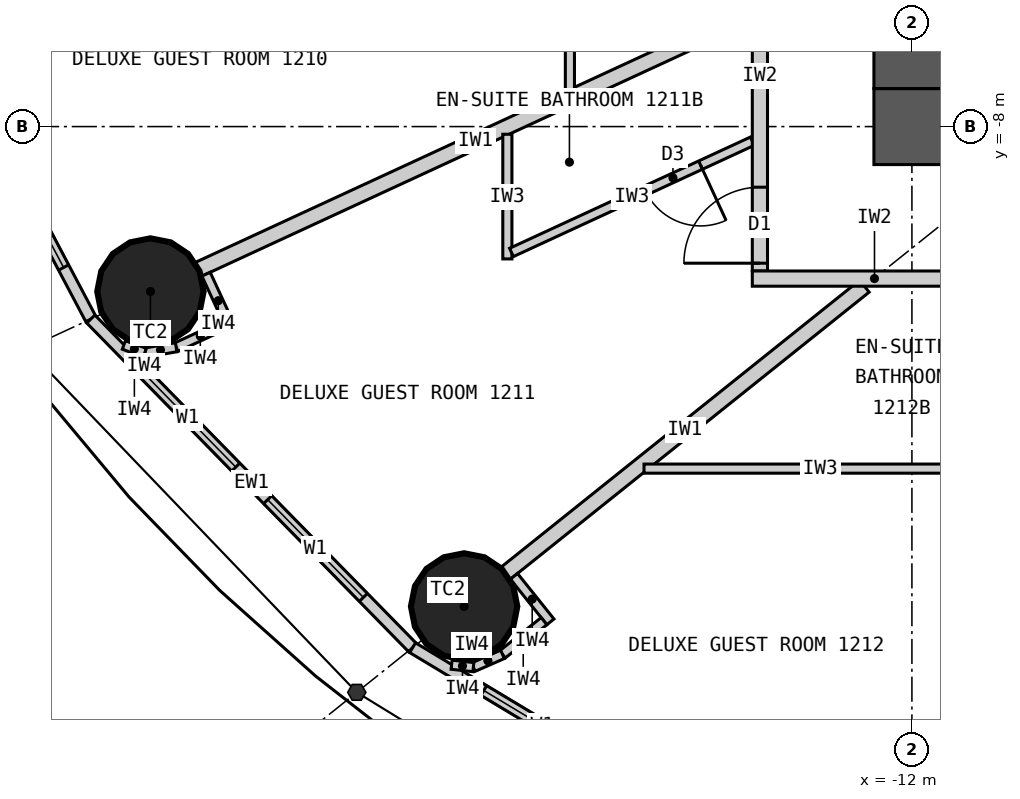
"""IFC4 building model, lengths in metres.
Left out: names, types, materials, properties, quantities, classifications, styles, units other than length and angle.
Written with IfcOpenShell. Run it as: python <this file> out.ifc"""

import sys

from ifc_helpers import new_model, si_unit, direction, frame, frame_2d, origin, origin_2d, place, context, subcontext, project, spatial, rectangle, circle, extrude, element, fill, save


model = new_model("IFC4")
c1 = context("Model", 3, precision=1e-05, world=origin(), true_north=direction((0.0, 1.0)))
c2 = subcontext(c1, "Body", "Model", "MODEL_VIEW")
j1 = project(units=[si_unit("LENGTHUNIT", "METRE"), si_unit("PLANEANGLEUNIT", "RADIAN")], contexts=[c1])
p1 = place(None, origin())
s1 = spatial("IfcSite", under=j1, at=p1, CompositionType="ELEMENT")
p2 = place(p1, origin())
s2 = spatial("IfcBuilding", under=s1, at=p2, CompositionType="ELEMENT")
p3 = place(p2, frame((0.0, 0.0, 54.0)))
s3 = spatial("IfcBuildingStorey", under=s2, at=p3, CompositionType="ELEMENT", Elevation=54.0)
for number, where, z_axis, x_axis in (
    (1, (-22.019, -10.17, 0.0), (0.0, 0.0, 1.0), (1.0, 0.0, 0.0)),
    (2, (-17.892, -14.313, 0.0), (0.0, 0.0, 1.0), (1.0, 0.0, 0.0)),
):
    element("IfcColumn", number, at=place(p3, frame(where, z_axis=z_axis, x_axis=x_axis)), inside=s3, PredefinedType="COLUMN", context=c2, shape_type="SweptSolid", body=[
        extrude(circle(Radius=0.7, at=origin_2d()), origin(), (0.0, 0.0, 1.0), 3.3),
    ])
p4 = place(p3, frame((12.5, -8.0, 0.0), z_axis=(0.0, 0.0, 1.0), x_axis=(-1.0, 0.0, 0.0)))
e3 = element("IfcWall", 3, at=p4, inside=s3, PredefinedType="SHEAR", context=c2, shape_type="SweptSolid", body=[
    extrude(rectangle(XDim=25.0, YDim=1.0, at=frame_2d((12.5, 0.0))), origin(), (0.0, 0.0, 1.0), 3.3),
])
p5 = place(p4, frame((11.2, 0.0, 0.0)))
e4 = element("IfcOpeningElement", 4, at=p5, cuts=e3, PredefinedType="OPENING", context=c2, shape_type="SweptSolid", body=[
    extrude(rectangle(XDim=1.2, YDim=2.2, at=frame_2d((0.6, 1.1))), frame((0.0, 0.51, 0.0), z_axis=(0.0, -1.0, 0.0), x_axis=(1.0, 0.0, 0.0)), (0.0, 0.0, 1.0), 1.02),
])
p6 = place(p4, frame((18.8, 0.0, 0.0)))
e5 = element("IfcOpeningElement", 5, at=p6, cuts=e3, PredefinedType="OPENING", context=c2, shape_type="SweptSolid", body=[
    extrude(rectangle(XDim=0.9, YDim=2.2, at=frame_2d((0.45, 1.1))), frame((0.0, 0.51, 0.0), z_axis=(0.0, -1.0, 0.0), x_axis=(1.0, 0.0, 0.0)), (0.0, 0.0, 1.0), 1.02),
])
p7 = place(p3, frame((-12.0, 7.5, 0.0), z_axis=(0.0, 0.0, 1.0), x_axis=(0.0, -1.0, 0.0)))
e6 = element("IfcWall", 6, at=p7, inside=s3, PredefinedType="SHEAR", context=c2, shape_type="SweptSolid", body=[
    extrude(rectangle(XDim=15.0, YDim=1.0, at=frame_2d((7.5, 0.0))), origin(), (0.0, 0.0, 1.0), 3.3),
])
p8 = place(p7, frame((6.6, 0.0, 0.0)))
e7 = element("IfcOpeningElement", 7, at=p8, cuts=e6, PredefinedType="OPENING", context=c2, shape_type="SweptSolid", body=[
    extrude(rectangle(XDim=1.8, YDim=2.2, at=frame_2d((0.9, 1.1))), frame((0.0, 0.51, 0.0), z_axis=(0.0, -1.0, 0.0), x_axis=(1.0, 0.0, 0.0)), (0.0, 0.0, 1.0), 1.02),
])
p9 = place(p3, frame((-25.482, -5.462, 0.0), z_axis=(0.0, 0.0, 1.0), x_axis=(0.467296867008, -0.884100468321, 0.0)))
e8 = element("IfcWall", 8, at=p9, inside=s3, PredefinedType="ELEMENTEDWALL", context=c2, shape_type="SweptSolid", body=[
    extrude(rectangle(XDim=5.734, YDim=0.15, at=frame_2d((2.867, 0.0))), origin(), (0.0, 0.0, 1.0), 3.12),
])
p10 = place(p9, frame((0.767, 0.0, 0.9)))
e9 = element("IfcOpeningElement", 9, at=p10, cuts=e8, PredefinedType="OPENING", context=c2, shape_type="SweptSolid", body=[
    extrude(rectangle(XDim=1.8, YDim=1.9, at=frame_2d((0.9, 0.95))), frame((0.0, 0.085, 0.0), z_axis=(0.0, -1.0, 0.0), x_axis=(1.0, 0.0, 0.0)), (0.0, 0.0, 1.0), 0.17),
])
p11 = place(p9, frame((3.167, 0.0, 0.9)))
e10 = element("IfcOpeningElement", 10, at=p11, cuts=e8, PredefinedType="OPENING", context=c2, shape_type="SweptSolid", body=[
    extrude(rectangle(XDim=1.8, YDim=1.9, at=frame_2d((0.9, 0.95))), frame((0.0, 0.085, 0.0), z_axis=(0.0, -1.0, 0.0), x_axis=(1.0, 0.0, 0.0)), (0.0, 0.0, 1.0), 0.17),
])
p12 = place(p3, frame((-22.803, -10.532, 0.0), z_axis=(0.0, 0.0, 1.0), x_axis=(0.699602905915, -0.714531856557, 0.0)))
e11 = element("IfcWall", 11, at=p12, inside=s3, PredefinedType="ELEMENTEDWALL", context=c2, shape_type="SweptSolid", body=[
    extrude(rectangle(XDim=6.051, YDim=0.15, at=frame_2d((3.025, 0.0))), origin(), (0.0, 0.0, 1.0), 3.12),
])
p13 = place(p12, frame((0.926, 0.0, 0.9)))
e12 = element("IfcOpeningElement", 12, at=p13, cuts=e11, PredefinedType="OPENING", context=c2, shape_type="SweptSolid", body=[
    extrude(rectangle(XDim=1.8, YDim=1.9, at=frame_2d((0.9, 0.95))), frame((0.0, 0.085, 0.0), z_axis=(0.0, -1.0, 0.0), x_axis=(1.0, 0.0, 0.0)), (0.0, 0.0, 1.0), 0.17),
])
p14 = place(p12, frame((3.325, 0.0, 0.9)))
e13 = element("IfcOpeningElement", 13, at=p14, cuts=e11, PredefinedType="OPENING", context=c2, shape_type="SweptSolid", body=[
    extrude(rectangle(XDim=1.8, YDim=1.9, at=frame_2d((0.9, 0.95))), frame((0.0, 0.085, 0.0), z_axis=(0.0, -1.0, 0.0), x_axis=(1.0, 0.0, 0.0)), (0.0, 0.0, 1.0), 0.17),
])
p15 = place(p3, frame((-18.57, -14.856, 0.0), z_axis=(0.0, 0.0, 1.0), x_axis=(0.856983180864, -0.515344377787, 0.0)))
e14 = element("IfcWall", 14, at=p15, inside=s3, PredefinedType="ELEMENTEDWALL", context=c2, shape_type="SweptSolid", body=[
    extrude(rectangle(XDim=6.386, YDim=0.15, at=frame_2d((3.193, 0.0))), origin(), (0.0, 0.0, 1.0), 3.12),
])
p16 = place(p15, frame((1.093, 0.0, 0.9)))
e15 = element("IfcOpeningElement", 15, at=p16, cuts=e14, PredefinedType="OPENING", context=c2, shape_type="SweptSolid", body=[
    extrude(rectangle(XDim=1.8, YDim=1.9, at=frame_2d((0.9, 0.95))), frame((0.0, 0.085, 0.0), z_axis=(0.0, -1.0, 0.0), x_axis=(1.0, 0.0, 0.0)), (0.0, 0.0, 1.0), 0.17),
])
p17 = place(p15, frame((3.493, 0.0, 0.9)))
e16 = element("IfcOpeningElement", 16, at=p17, cuts=e14, PredefinedType="OPENING", context=c2, shape_type="SweptSolid", body=[
    extrude(rectangle(XDim=1.8, YDim=1.9, at=frame_2d((0.9, 0.95))), frame((0.0, 0.085, 0.0), z_axis=(0.0, -1.0, 0.0), x_axis=(1.0, 0.0, 0.0)), (0.0, 0.0, 1.0), 0.17),
])
p18 = place(p3, frame((-14.1, -6.512, 0.0), z_axis=(0.0, 0.0, 1.0), x_axis=(-0.907832871056, -0.419332181247, 0.0)))
e17 = element("IfcWall", 17, at=p18, inside=s3, PredefinedType="PARTITIONING", context=c2, shape_type="SweptSolid", body=[
    extrude(rectangle(XDim=8.023, YDim=0.2, at=frame_2d((4.011, 0.0))), origin(), (0.0, 0.0, 1.0), 2.32),
])
p19 = place(p3, frame((-12.625, -10.1, 0.0), z_axis=(0.0, 0.0, 1.0), x_axis=(-0.780892451574, -0.624665493744, 0.0)))
e18 = element("IfcWall", 18, at=p19, inside=s3, PredefinedType="PARTITIONING", context=c2, shape_type="SweptSolid", body=[
    extrude(rectangle(XDim=6.045, YDim=0.2, at=frame_2d((3.022, 0.0))), origin(), (0.0, 0.0, 1.0), 2.32),
])
p20 = place(p3, frame((-7.289, -10.1, 0.0), z_axis=(0.0, 0.0, 1.0), x_axis=(-0.585198353053, -0.810890182197, 0.0)))
e19 = element("IfcWall", 19, at=p20, inside=s3, PredefinedType="PARTITIONING", context=c2, shape_type="SweptSolid", body=[
    extrude(rectangle(XDim=8.36, YDim=0.2, at=frame_2d((4.18, 0.0))), origin(), (0.0, 0.0, 1.0), 2.32),
])
p21 = place(p3, frame((-16.5, -7.521, 0.0), z_axis=(0.0, 0.0, 1.0), x_axis=(0.0, 1.0, 0.0)))
e20 = element("IfcWall", 20, at=p21, inside=s3, PredefinedType="PARTITIONING", context=c2, shape_type="SweptSolid", body=[
    extrude(rectangle(XDim=2.749, YDim=0.12, at=frame_2d((1.374, 0.0))), origin(), (0.0, 0.0, 1.0), 3.12),
])
p22 = place(p3, frame((-17.323, -8.101, 0.0), z_axis=(0.0, 0.0, 1.0), x_axis=(0.0, -1.0, 0.0)))
e21 = element("IfcWall", 21, at=p22, inside=s3, PredefinedType="PARTITIONING", context=c2, shape_type="SweptSolid", body=[
    extrude(rectangle(XDim=1.64, YDim=0.12, at=frame_2d((0.82, 0.0))), origin(), (0.0, 0.0, 1.0), 3.12),
])
p23 = place(p3, frame((-14.1, -8.193, 0.0), z_axis=(0.0, 0.0, 1.0), x_axis=(-0.907836493557, -0.419324338628, 0.0)))
e22 = element("IfcWall", 22, at=p23, inside=s3, PredefinedType="PARTITIONING", context=c2, shape_type="SweptSolid", body=[
    extrude(rectangle(XDim=3.49, YDim=0.12, at=frame_2d((1.745, 0.0))), origin(), (0.0, 0.0, 1.0), 3.12),
])
p24 = place(p23, frame((0.75, 0.0, 0.0)))
e23 = element("IfcOpeningElement", 23, at=p24, cuts=e22, PredefinedType="OPENING", context=c2, shape_type="SweptSolid", body=[
    extrude(rectangle(XDim=0.8, YDim=2.1, at=frame_2d((0.4, 1.05))), frame((0.0, 0.07, 0.0), z_axis=(0.0, -1.0, 0.0), x_axis=(1.0, 0.0, 0.0)), (0.0, 0.0, 1.0), 0.14),
])
p25 = place(p3, frame((-15.525, -12.5, 0.0), z_axis=(0.0, 0.0, 1.0), x_axis=(1.0, 0.0, 0.0)))
e24 = element("IfcWall", 24, at=p25, inside=s3, PredefinedType="PARTITIONING", context=c2, shape_type="SweptSolid", body=[
    extrude(rectangle(XDim=4.64, YDim=0.12, at=frame_2d((2.32, 0.0))), origin(), (0.0, 0.0, 1.0), 3.12),
])
p26 = place(p3, frame((-14.0, -4.772, 0.0), z_axis=(0.0, 0.0, 1.0), x_axis=(0.0, -1.0, 0.0)))
e25 = element("IfcWall", 25, at=p26, inside=s3, PredefinedType="PARTITIONING", context=c2, shape_type="SweptSolid", body=[
    extrude(rectangle(XDim=5.127, YDim=0.2, at=frame_2d((2.564, 0.0))), origin(), (0.0, 0.0, 1.0), 3.12),
])
p27 = place(p26, frame((4.025, 0.0, 0.0)))
e26 = element("IfcOpeningElement", 26, at=p27, cuts=e25, PredefinedType="OPENING", context=c2, shape_type="SweptSolid", body=[
    extrude(rectangle(XDim=1.0, YDim=2.2, at=frame_2d((0.5, 1.1))), frame((0.0, 0.11, 0.0), z_axis=(0.0, -1.0, 0.0), x_axis=(1.0, 0.0, 0.0)), (0.0, 0.0, 1.0), 0.22),
])
p28 = place(p3, frame((-10.885, -10.0, 0.0), z_axis=(0.0, 0.0, 1.0), x_axis=(-1.0, 0.0, 0.0)))
e27 = element("IfcWall", 27, at=p28, inside=s3, PredefinedType="PARTITIONING", context=c2, shape_type="SweptSolid", body=[
    extrude(rectangle(XDim=3.215, YDim=0.2, at=frame_2d((1.607, 0.0))), origin(), (0.0, 0.0, 1.0), 3.12),
])
p29 = place(p3, frame((-21.287, -9.942, 0.0), z_axis=(0.0, 0.0, 1.0), x_axis=(0.419259891039, -0.907866258744, 0.0)))
e28 = element("IfcWall", 28, at=p29, inside=s3, PredefinedType="PARTITIONING", context=c2, shape_type="SweptSolid", body=[
    extrude(rectangle(XDim=0.768, YDim=0.12, at=frame_2d((0.384, 0.0))), origin(), (0.0, 0.0, 1.0), 3.12),
])
p30 = place(p3, frame((-21.045, -10.61, 0.0), z_axis=(0.0, 0.0, 1.0), x_axis=(-0.907877701396, -0.419235112208, 0.0)))
e29 = element("IfcWall", 29, at=p30, inside=s3, PredefinedType="PARTITIONING", context=c2, shape_type="SweptSolid", body=[
    extrude(rectangle(XDim=0.7, YDim=0.12, at=frame_2d((0.35, 0.0))), origin(), (0.0, 0.0, 1.0), 3.12),
])
p31 = place(p3, frame((-21.68, -10.903, 0.0), z_axis=(0.0, 0.0, 1.0), x_axis=(-0.985446622073, -0.169985161247, 0.0)))
e30 = element("IfcWall", 30, at=p31, inside=s3, PredefinedType="PARTITIONING", context=c2, shape_type="SweptSolid", body=[
    extrude(rectangle(XDim=0.418, YDim=0.12, at=frame_2d((0.209, 0.0))), origin(), (0.0, 0.0, 1.0), 3.12),
])
p32 = place(p3, frame((-22.092, -10.974, 0.0), z_axis=(0.0, 0.0, 1.0), x_axis=(-0.938428160676, 0.345474437912, 0.0)))
e31 = element("IfcWall", 31, at=p32, inside=s3, PredefinedType="PARTITIONING", context=c2, shape_type="SweptSolid", body=[
    extrude(rectangle(XDim=0.294, YDim=0.12, at=frame_2d((0.147, 0.0))), origin(), (0.0, 0.0, 1.0), 3.12),
])
p33 = place(p3, frame((-17.236, -13.917, 0.0), z_axis=(0.0, 0.0, 1.0), x_axis=(0.624695047554, -0.780868809443, 0.0)))
e32 = element("IfcWall", 32, at=p33, inside=s3, PredefinedType="PARTITIONING", context=c2, shape_type="SweptSolid", body=[
    extrude(rectangle(XDim=0.768, YDim=0.12, at=frame_2d((0.384, 0.0))), origin(), (0.0, 0.0, 1.0), 3.12),
])
p34 = place(p3, frame((-16.841, -14.507, 0.0), z_axis=(0.0, 0.0, 1.0), x_axis=(-0.780902834923, -0.62465251333, 0.0)))
e33 = element("IfcWall", 33, at=p34, inside=s3, PredefinedType="PARTITIONING", context=c2, shape_type="SweptSolid", body=[
    extrude(rectangle(XDim=0.7, YDim=0.12, at=frame_2d((0.35, 0.0))), origin(), (0.0, 0.0, 1.0), 3.12),
])
p35 = place(p3, frame((-17.387, -14.944, 0.0), z_axis=(0.0, 0.0, 1.0), x_axis=(-0.916036698064, -0.401094462441, 0.0)))
e34 = element("IfcWall", 34, at=p35, inside=s3, PredefinedType="PARTITIONING", context=c2, shape_type="SweptSolid", body=[
    extrude(rectangle(XDim=0.418, YDim=0.12, at=frame_2d((0.209, 0.0))), origin(), (0.0, 0.0, 1.0), 3.12),
])
p36 = place(p3, frame((-17.77, -15.112, 0.0), z_axis=(0.0, 0.0, 1.0), x_axis=(-0.993904401174, 0.110245368731, 0.0)))
e35 = element("IfcWall", 35, at=p36, inside=s3, PredefinedType="PARTITIONING", context=c2, shape_type="SweptSolid", body=[
    extrude(rectangle(XDim=0.288, YDim=0.12, at=frame_2d((0.144, 0.0))), origin(), (0.0, 0.0, 1.0), 3.12),
])
p37 = place(p11, origin())
e36 = element("IfcWindow", 36, at=p37, inside=s3, PartitioningType="SINGLE_PANEL", PredefinedType="WINDOW", context=c2, shape_type="SweptSolid", body=[
    extrude(rectangle(XDim=1.8, YDim=1.9, at=frame_2d((0.9, 0.95))), frame((0.0, 0.03, 0.0), z_axis=(0.0, -1.0, 0.0), x_axis=(1.0, 0.0, 0.0)), (0.0, 0.0, 1.0), 0.06),
])
fill(e10, e36)
p38 = place(p13, origin())
e37 = element("IfcWindow", 37, at=p38, inside=s3, PartitioningType="SINGLE_PANEL", PredefinedType="WINDOW", context=c2, shape_type="SweptSolid", body=[
    extrude(rectangle(XDim=1.8, YDim=1.9, at=frame_2d((0.9, 0.95))), frame((0.0, 0.03, 0.0), z_axis=(0.0, -1.0, 0.0), x_axis=(1.0, 0.0, 0.0)), (0.0, 0.0, 1.0), 0.06),
])
fill(e12, e37)
p39 = place(p14, origin())
e38 = element("IfcWindow", 38, at=p39, inside=s3, PartitioningType="SINGLE_PANEL", PredefinedType="WINDOW", context=c2, shape_type="SweptSolid", body=[
    extrude(rectangle(XDim=1.8, YDim=1.9, at=frame_2d((0.9, 0.95))), frame((0.0, 0.03, 0.0), z_axis=(0.0, -1.0, 0.0), x_axis=(1.0, 0.0, 0.0)), (0.0, 0.0, 1.0), 0.06),
])
fill(e13, e38)
p40 = place(p16, origin())
e39 = element("IfcWindow", 39, at=p40, inside=s3, PartitioningType="SINGLE_PANEL", PredefinedType="WINDOW", context=c2, shape_type="SweptSolid", body=[
    extrude(rectangle(XDim=1.8, YDim=1.9, at=frame_2d((0.9, 0.95))), frame((0.0, 0.03, 0.0), z_axis=(0.0, -1.0, 0.0), x_axis=(1.0, 0.0, 0.0)), (0.0, 0.0, 1.0), 0.06),
])
fill(e15, e39)
p41 = place(p24, origin())
e40 = element("IfcDoor", 40, at=p41, inside=s3, OperationType="SINGLE_SWING_LEFT", PredefinedType="DOOR", context=c2, shape_type="SweptSolid", body=[
    extrude(rectangle(XDim=0.8, YDim=2.1, at=frame_2d((0.4, 1.05))), frame((0.0, 0.025, 0.0), z_axis=(0.0, -1.0, 0.0), x_axis=(1.0, 0.0, 0.0)), (0.0, 0.0, 1.0), 0.05),
])
fill(e23, e40)
p42 = place(p27, origin())
e41 = element("IfcDoor", 41, at=p42, inside=s3, OperationType="SINGLE_SWING_RIGHT", PredefinedType="DOOR", context=c2, shape_type="SweptSolid", body=[
    extrude(rectangle(XDim=1.0, YDim=2.2, at=frame_2d((0.5, 1.1))), frame((0.0, 0.025, 0.0), z_axis=(0.0, -1.0, 0.0), x_axis=(1.0, 0.0, 0.0)), (0.0, 0.0, 1.0), 0.05),
])
fill(e26, e41)
save(model, sys.argv[1])
